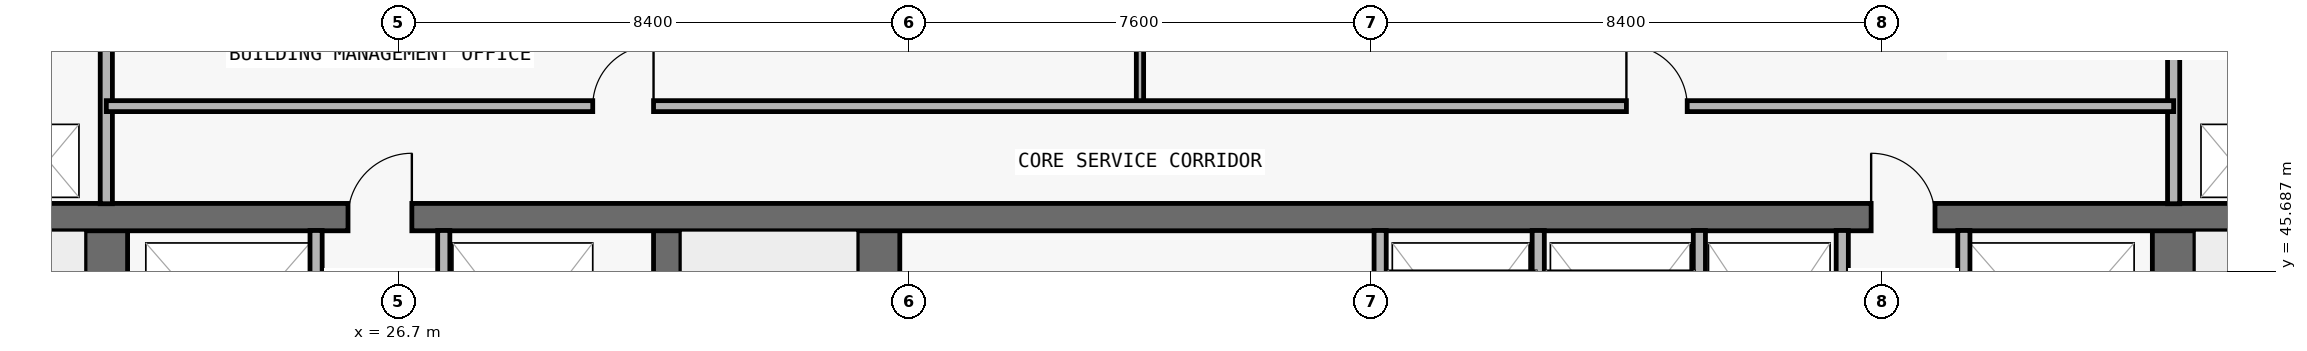
"""IFC4 building model, lengths in metres.
Left out: names, types, materials, properties, quantities, classifications, styles, units other than length and angle.
Written with IfcOpenShell. Run it as: python <this file> out.ifc"""

import sys

from ifc_helpers import new_model, si_unit, direction, frame, frame_2d, origin, place, context, subcontext, project, spatial, rectangle, extrude, element, fill, save


model = new_model("IFC4")
c1 = context("Model", 3, precision=1e-05, world=origin(), true_north=direction((0.0, 1.0)))
c2 = subcontext(c1, "Body", "Model", "MODEL_VIEW")
j1 = project(units=[si_unit("LENGTHUNIT", "METRE"), si_unit("PLANEANGLEUNIT", "RADIAN")], contexts=[c1])
p1 = place(None, origin())
s1 = spatial("IfcSite", under=j1, at=p1, CompositionType="ELEMENT")
p2 = place(p1, origin())
s2 = spatial("IfcBuilding", under=s1, at=p2, CompositionType="ELEMENT")
p3 = place(p2, frame((0.0, 0.0, 115.8)))
s3 = spatial("IfcBuildingStorey", under=s2, at=p3, CompositionType="ELEMENT", Elevation=115.8)
p4 = place(p3, frame((21.9, 36.95, 0.0), z_axis=(0.0, 0.0, 1.0), x_axis=(0.0, 1.0, 0.0)))
e1 = element("IfcWall", 1, at=p4, inside=s3, PredefinedType="SHEAR", context=c2, shape_type="SweptSolid", body=[
    extrude(rectangle(XDim=9.625, YDim=0.7, at=frame_2d((4.812, 0.0))), origin(), (0.0, 0.0, 1.0), 3.05),
])
p5 = place(p4, frame((0.6, 0.0, 0.0)))
e2 = element("IfcOpeningElement", 2, at=p5, cuts=e1, PredefinedType="OPENING", context=c2, shape_type="SweptSolid", body=[
    extrude(rectangle(XDim=1.1, YDim=2.15, at=frame_2d((0.55, 1.075))), frame((0.0, 0.36, 0.0), z_axis=(0.0, -1.0, 0.0), x_axis=(1.0, 0.0, 0.0)), (0.0, 0.0, 1.0), 0.72),
])
p6 = place(p3, frame((55.9, 36.95, 0.0), z_axis=(0.0, 0.0, 1.0), x_axis=(0.0, 1.0, 0.0)))
e3 = element("IfcWall", 3, at=p6, inside=s3, PredefinedType="SHEAR", context=c2, shape_type="SweptSolid", body=[
    extrude(rectangle(XDim=9.625, YDim=0.7, at=frame_2d((4.812, 0.0))), origin(), (0.0, 0.0, 1.0), 3.05),
])
p7 = place(p6, frame((0.6, 0.0, 0.0)))
e4 = element("IfcOpeningElement", 4, at=p7, cuts=e3, PredefinedType="OPENING", context=c2, shape_type="SweptSolid", body=[
    extrude(rectangle(XDim=1.1, YDim=2.15, at=frame_2d((0.55, 1.075))), frame((0.0, 0.36, 0.0), z_axis=(0.0, -1.0, 0.0), x_axis=(1.0, 0.0, 0.0)), (0.0, 0.0, 1.0), 0.72),
])
p8 = place(p3, frame((31.125, 36.95, 0.0), z_axis=(0.0, 0.0, 1.0), x_axis=(0.0, 1.0, 0.0)))
e5 = element("IfcWall", 5, at=p8, inside=s3, PredefinedType="SHEAR", context=c2, shape_type="SweptSolid", body=[
    extrude(rectangle(XDim=9.625, YDim=0.45, at=frame_2d((4.812, 0.0))), origin(), (0.0, 0.0, 1.0), 3.05),
])
p9 = place(p3, frame((34.6, 36.95, 0.0), z_axis=(0.0, 0.0, 1.0), x_axis=(0.0, 1.0, 0.0)))
e6 = element("IfcWall", 6, at=p9, inside=s3, PredefinedType="SHEAR", context=c2, shape_type="SweptSolid", body=[
    extrude(rectangle(XDim=9.625, YDim=0.7, at=frame_2d((4.812, 0.0))), origin(), (0.0, 0.0, 1.0), 3.05),
])
p10 = place(p3, frame((18.25, 46.575, 0.0), z_axis=(0.0, 0.0, 1.0), x_axis=(1.0, 0.0, 0.0)))
e7 = element("IfcWall", 7, at=p10, inside=s3, PredefinedType="SHEAR", context=c2, shape_type="SweptSolid", body=[
    extrude(rectangle(XDim=41.3, YDim=0.45, at=frame_2d((20.65, 0.0))), origin(), (0.0, 0.0, 1.0), 3.05),
])
p11 = place(p10, frame((7.625, 0.0, 0.0)))
e8 = element("IfcOpeningElement", 8, at=p11, cuts=e7, PredefinedType="OPENING", context=c2, shape_type="SweptSolid", body=[
    extrude(rectangle(XDim=1.05, YDim=2.15, at=frame_2d((0.525, 1.075))), frame((0.0, 0.235, 0.0), z_axis=(0.0, -1.0, 0.0), x_axis=(1.0, 0.0, 0.0)), (0.0, 0.0, 1.0), 0.47),
])
p12 = place(p10, frame((32.675, 0.0, 0.0)))
e9 = element("IfcOpeningElement", 9, at=p12, cuts=e7, PredefinedType="OPENING", context=c2, shape_type="SweptSolid", body=[
    extrude(rectangle(XDim=1.05, YDim=2.15, at=frame_2d((0.525, 1.075))), frame((0.0, 0.235, 0.0), z_axis=(0.0, -1.0, 0.0), x_axis=(1.0, 0.0, 0.0)), (0.0, 0.0, 1.0), 0.47),
])
p13 = place(p3, frame((21.9, 46.795, 0.0), z_axis=(0.0, 0.0, 1.0), x_axis=(0.0, 1.0, 0.0)))
e10 = element("IfcWall", 10, at=p13, inside=s3, PredefinedType="PARTITIONING", context=c2, shape_type="SweptSolid", body=[
    extrude(rectangle(XDim=3.16, YDim=0.2, at=frame_2d((1.58, 0.0))), origin(), (0.0, 0.0, 1.0), 3.05),
])
for number, where, z_axis, x_axis in (
    (11, (25.35, 43.17, 0.0), (0.0, 0.0, 1.0), (0.0, 1.0, 0.0)),
    (12, (27.45, 43.17, 0.0), (0.0, 0.0, 1.0), (0.0, 1.0, 0.0)),
):
    element("IfcWall", number, at=place(p3, frame(where, z_axis=z_axis, x_axis=x_axis)), inside=s3, PredefinedType="PARTITIONING", context=c2, shape_type="SweptSolid", body=[
        extrude(rectangle(XDim=3.185, YDim=0.2, at=frame_2d((1.593, 0.0))), origin(), (0.0, 0.0, 1.0), 3.05),
    ])
p14 = place(p3, frame((38.9, 48.4, 0.0), z_axis=(0.0, 0.0, 1.0), x_axis=(0.0, 1.0, 0.0)))
e13 = element("IfcWall", 13, at=p14, inside=s3, PredefinedType="PARTITIONING", context=c2, shape_type="SweptSolid", body=[
    extrude(rectangle(XDim=1.555, YDim=0.12, at=frame_2d((0.778, 0.0))), origin(), (0.0, 0.0, 1.0), 3.05),
])
for number, where, z_axis, x_axis in (
    (14, (42.85, 43.17, 0.0), (0.0, 0.0, 1.0), (0.0, 1.0, 0.0)),
    (15, (45.45, 43.17, 0.0), (0.0, 0.0, 1.0), (0.0, 1.0, 0.0)),
    (16, (48.1, 43.17, 0.0), (0.0, 0.0, 1.0), (0.0, 1.0, 0.0)),
    (17, (50.45, 43.17, 0.0), (0.0, 0.0, 1.0), (0.0, 1.0, 0.0)),
    (18, (52.45, 43.17, 0.0), (0.0, 0.0, 1.0), (0.0, 1.0, 0.0)),
):
    element("IfcWall", number, at=place(p3, frame(where, z_axis=z_axis, x_axis=x_axis)), inside=s3, PredefinedType="PARTITIONING", context=c2, shape_type="SweptSolid", body=[
        extrude(rectangle(XDim=3.185, YDim=0.2, at=frame_2d((1.593, 0.0))), origin(), (0.0, 0.0, 1.0), 3.05),
    ])
p15 = place(p3, frame((55.9, 46.795, 0.0), z_axis=(0.0, 0.0, 1.0), x_axis=(0.0, 1.0, 0.0)))
e19 = element("IfcWall", 19, at=p15, inside=s3, PredefinedType="PARTITIONING", context=c2, shape_type="SweptSolid", body=[
    extrude(rectangle(XDim=3.16, YDim=0.2, at=frame_2d((1.58, 0.0))), origin(), (0.0, 0.0, 1.0), 3.05),
])
p16 = place(p3, frame((21.9, 48.4, 0.0), z_axis=(0.0, 0.0, 1.0), x_axis=(1.0, 0.0, 0.0)))
e20 = element("IfcWall", 20, at=p16, inside=s3, PredefinedType="PARTITIONING", context=c2, shape_type="SweptSolid", body=[
    extrude(rectangle(XDim=34.0, YDim=0.18, at=frame_2d((17.0, 0.0))), origin(), (0.0, 0.0, 1.0), 3.05),
])
p17 = place(p16, frame((8.0, 0.0, 0.0)))
e21 = element("IfcOpeningElement", 21, at=p17, cuts=e20, PredefinedType="OPENING", context=c2, shape_type="SweptSolid", body=[
    extrude(rectangle(XDim=1.0, YDim=2.2, at=frame_2d((0.5, 1.1))), frame((0.0, 0.1, 0.0), z_axis=(0.0, -1.0, 0.0), x_axis=(1.0, 0.0, 0.0)), (0.0, 0.0, 1.0), 0.2),
])
p18 = place(p16, frame((25.0, 0.0, 0.0)))
e22 = element("IfcOpeningElement", 22, at=p18, cuts=e20, PredefinedType="OPENING", context=c2, shape_type="SweptSolid", body=[
    extrude(rectangle(XDim=1.0, YDim=2.2, at=frame_2d((0.5, 1.1))), frame((0.0, 0.1, 0.0), z_axis=(0.0, -1.0, 0.0), x_axis=(1.0, 0.0, 0.0)), (0.0, 0.0, 1.0), 0.2),
])
p19 = place(p11, origin())
e23 = element("IfcDoor", 23, at=p19, inside=s3, OperationType="SINGLE_SWING_RIGHT", PredefinedType="DOOR", context=c2, shape_type="SweptSolid", body=[
    extrude(rectangle(XDim=1.05, YDim=2.15, at=frame_2d((0.525, 1.075))), frame((0.0, 0.025, 0.0), z_axis=(0.0, -1.0, 0.0), x_axis=(1.0, 0.0, 0.0)), (0.0, 0.0, 1.0), 0.05),
])
fill(e8, e23)
p20 = place(p12, origin())
e24 = element("IfcDoor", 24, at=p20, inside=s3, OperationType="SINGLE_SWING_LEFT", PredefinedType="DOOR", context=c2, shape_type="SweptSolid", body=[
    extrude(rectangle(XDim=1.05, YDim=2.15, at=frame_2d((0.525, 1.075))), frame((0.0, 0.025, 0.0), z_axis=(0.0, -1.0, 0.0), x_axis=(1.0, 0.0, 0.0)), (0.0, 0.0, 1.0), 0.05),
])
fill(e9, e24)
p21 = place(p17, origin())
e25 = element("IfcDoor", 25, at=p21, inside=s3, OperationType="SINGLE_SWING_RIGHT", PredefinedType="DOOR", context=c2, shape_type="SweptSolid", body=[
    extrude(rectangle(XDim=1.0, YDim=2.2, at=frame_2d((0.5, 1.1))), frame((0.0, 0.025, 0.0), z_axis=(0.0, -1.0, 0.0), x_axis=(1.0, 0.0, 0.0)), (0.0, 0.0, 1.0), 0.05),
])
fill(e21, e25)
p22 = place(p18, origin())
e26 = element("IfcDoor", 26, at=p22, inside=s3, OperationType="SINGLE_SWING_LEFT", PredefinedType="DOOR", context=c2, shape_type="SweptSolid", body=[
    extrude(rectangle(XDim=1.0, YDim=2.2, at=frame_2d((0.5, 1.1))), frame((0.0, 0.025, 0.0), z_axis=(0.0, -1.0, 0.0), x_axis=(1.0, 0.0, 0.0)), (0.0, 0.0, 1.0), 0.05),
])
fill(e22, e26)
save(model, sys.argv[1])
